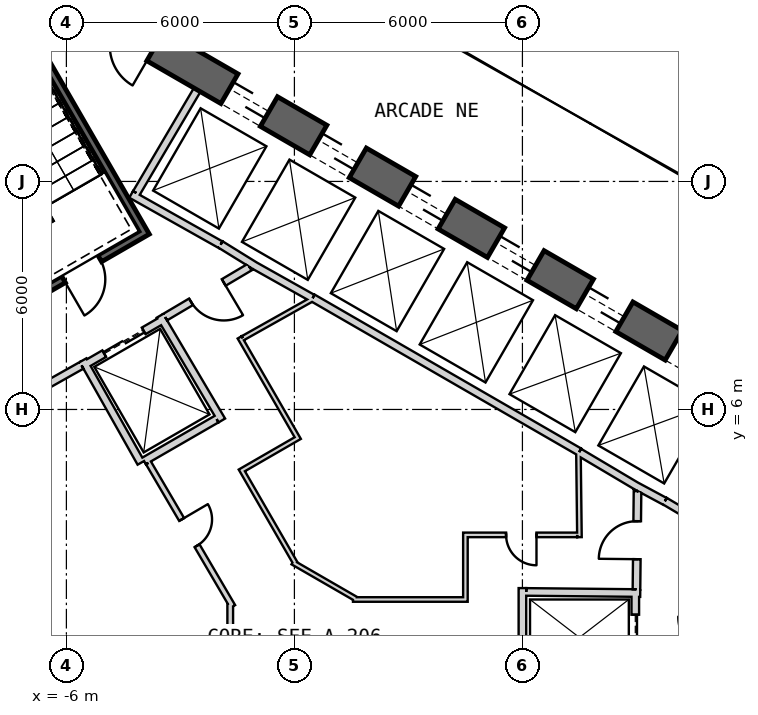
"""IFC4 building model, lengths in metres.
Left out: names, types, materials, properties, quantities, classifications, styles, units other than length and angle.
Written with IfcOpenShell. Run it as: python <this file> out.ifc"""

import sys

from ifc_helpers import new_model, si_unit, direction, frame, frame_2d, origin, place, context, subcontext, project, spatial, rectangle, extrude, element, fill, save


model = new_model("IFC4")
c1 = context("Model", 3, precision=1e-05, world=origin(), true_north=direction((0.0, 1.0)))
c2 = subcontext(c1, "Body", "Model", "MODEL_VIEW")
j1 = project(units=[si_unit("LENGTHUNIT", "METRE"), si_unit("PLANEANGLEUNIT", "RADIAN")], contexts=[c1])
p1 = place(None, origin())
s1 = spatial("IfcSite", under=j1, at=p1, CompositionType="ELEMENT")
p2 = place(p1, origin())
s2 = spatial("IfcBuilding", under=s1, at=p2, CompositionType="ELEMENT")
p3 = place(p2, frame((0.0, 0.0, 21.5)))
s3 = spatial("IfcBuildingStorey", under=s2, at=p3, CompositionType="ELEMENT", Elevation=21.5)
p4 = place(p3, frame((19.475, 2.208, 0.0), z_axis=(0.0, 0.0, 1.0), x_axis=(-0.866028369851, 0.499994862586, 0.0)))
e1 = element("IfcWall", 1, at=p4, inside=s3, PredefinedType="SHEAR", context=c2, shape_type="SweptSolid", body=[
    extrude(rectangle(XDim=31.523, YDim=0.9, at=frame_2d((15.762, 0.0))), origin(), (0.0, 0.0, 1.0), 6.0),
])
p5 = place(p4, frame((7.062, 0.0, 0.0)))
e2 = element("IfcOpeningElement", 2, at=p5, cuts=e1, PredefinedType="OPENING", context=c2, shape_type="SweptSolid", body=[
    extrude(rectangle(XDim=1.2, YDim=2.4, at=frame_2d((0.6, 1.2))), frame((0.0, 0.46, 0.0), z_axis=(0.0, -1.0, 0.0), x_axis=(1.0, 0.0, 0.0)), (0.0, 0.0, 1.0), 0.92),
])
p6 = place(p4, frame((9.762, 0.0, 0.0)))
e3 = element("IfcOpeningElement", 3, at=p6, cuts=e1, PredefinedType="OPENING", context=c2, shape_type="SweptSolid", body=[
    extrude(rectangle(XDim=1.2, YDim=2.4, at=frame_2d((0.6, 1.2))), frame((0.0, 0.46, 0.0), z_axis=(0.0, -1.0, 0.0), x_axis=(1.0, 0.0, 0.0)), (0.0, 0.0, 1.0), 0.92),
])
p7 = place(p4, frame((12.462, 0.0, 0.0)))
e4 = element("IfcOpeningElement", 4, at=p7, cuts=e1, PredefinedType="OPENING", context=c2, shape_type="SweptSolid", body=[
    extrude(rectangle(XDim=1.2, YDim=2.4, at=frame_2d((0.6, 1.2))), frame((0.0, 0.46, 0.0), z_axis=(0.0, -1.0, 0.0), x_axis=(1.0, 0.0, 0.0)), (0.0, 0.0, 1.0), 0.92),
])
p8 = place(p4, frame((15.162, 0.0, 0.0)))
e5 = element("IfcOpeningElement", 5, at=p8, cuts=e1, PredefinedType="OPENING", context=c2, shape_type="SweptSolid", body=[
    extrude(rectangle(XDim=1.2, YDim=2.4, at=frame_2d((0.6, 1.2))), frame((0.0, 0.46, 0.0), z_axis=(0.0, -1.0, 0.0), x_axis=(1.0, 0.0, 0.0)), (0.0, 0.0, 1.0), 0.92),
])
p9 = place(p4, frame((17.862, 0.0, 0.0)))
e6 = element("IfcOpeningElement", 6, at=p9, cuts=e1, PredefinedType="OPENING", context=c2, shape_type="SweptSolid", body=[
    extrude(rectangle(XDim=1.2, YDim=2.4, at=frame_2d((0.6, 1.2))), frame((0.0, 0.46, 0.0), z_axis=(0.0, -1.0, 0.0), x_axis=(1.0, 0.0, 0.0)), (0.0, 0.0, 1.0), 0.92),
])
p10 = place(p4, frame((20.562, 0.0, 0.0)))
e7 = element("IfcOpeningElement", 7, at=p10, cuts=e1, PredefinedType="OPENING", context=c2, shape_type="SweptSolid", body=[
    extrude(rectangle(XDim=1.2, YDim=2.4, at=frame_2d((0.6, 1.2))), frame((0.0, 0.46, 0.0), z_axis=(0.0, -1.0, 0.0), x_axis=(1.0, 0.0, 0.0)), (0.0, 0.0, 1.0), 0.92),
])
p11 = place(p4, frame((23.262, 0.0, 0.0)))
e8 = element("IfcOpeningElement", 8, at=p11, cuts=e1, PredefinedType="OPENING", context=c2, shape_type="SweptSolid", body=[
    extrude(rectangle(XDim=1.2, YDim=2.4, at=frame_2d((0.6, 1.2))), frame((0.0, 0.46, 0.0), z_axis=(0.0, -1.0, 0.0), x_axis=(1.0, 0.0, 0.0)), (0.0, 0.0, 1.0), 0.92),
])
p12 = place(p4, frame((3.612, 0.0, 0.0)))
e9 = element("IfcOpeningElement", 9, at=p12, cuts=e1, PredefinedType="OPENING", context=c2, shape_type="SweptSolid", body=[
    extrude(rectangle(XDim=1.2, YDim=2.4, at=frame_2d((0.6, 1.2))), frame((0.0, 0.46, 0.0), z_axis=(0.0, -1.0, 0.0), x_axis=(1.0, 0.0, 0.0)), (0.0, 0.0, 1.0), 0.92),
])
p13 = place(p4, frame((26.712, 0.0, 0.0)))
e10 = element("IfcOpeningElement", 10, at=p13, cuts=e1, PredefinedType="OPENING", context=c2, shape_type="SweptSolid", body=[
    extrude(rectangle(XDim=1.2, YDim=2.4, at=frame_2d((0.6, 1.2))), frame((0.0, 0.46, 0.0), z_axis=(0.0, -1.0, 0.0), x_axis=(1.0, 0.0, 0.0)), (0.0, 0.0, 1.0), 0.92),
])
p14 = place(p3, frame((7.497, 4.886, 0.0), z_axis=(0.0, 0.0, 1.0), x_axis=(-0.866030989016, 0.499990325971, 0.0)))
e11 = element("IfcWall", 11, at=p14, inside=s3, PredefinedType="PLUMBINGWALL", context=c2, shape_type="SweptSolid", body=[
    extrude(rectangle(XDim=8.1, YDim=0.2, at=frame_2d((4.05, 0.0))), origin(), (0.0, 0.0, 1.0), 5.7),
])
p15 = place(p3, frame((12.073, 2.211, 0.0), z_axis=(0.0, 0.0, 1.0), x_axis=(-0.860438357912, 0.509554542943, 0.0)))
e12 = element("IfcWall", 12, at=p15, inside=s3, PredefinedType="PLUMBINGWALL", context=c2, shape_type="SweptSolid", body=[
    extrude(rectangle(XDim=2.7, YDim=0.2, at=frame_2d((1.35, 0.0))), origin(), (0.0, 0.0, 1.0), 5.7),
])
p16 = place(p3, frame((9.748, 3.583, 0.0), z_axis=(0.0, 0.0, 1.0), x_axis=(-0.880917147855, 0.473270513147, 0.0)))
e13 = element("IfcWall", 13, at=p16, inside=s3, PredefinedType="PLUMBINGWALL", context=c2, shape_type="SweptSolid", body=[
    extrude(rectangle(XDim=0.878, YDim=0.2, at=frame_2d((0.439, 0.0))), origin(), (0.0, 0.0, 1.0), 5.7),
])
p17 = place(p3, frame((9.08, 3.937, 0.0), z_axis=(0.0, 0.0, 1.0), x_axis=(-0.859981807212, 0.510324691999, 0.0)))
e14 = element("IfcWall", 14, at=p17, inside=s3, PredefinedType="PLUMBINGWALL", context=c2, shape_type="SweptSolid", body=[
    extrude(rectangle(XDim=1.845, YDim=0.2, at=frame_2d((0.922, 0.0))), origin(), (0.0, 0.0, 1.0), 5.7),
])
p18 = place(p3, frame((-1.941, 10.339, 0.0), z_axis=(0.0, 0.0, 1.0), x_axis=(0.850216889117, -0.526432561171, 0.0)))
e15 = element("IfcWall", 15, at=p18, inside=s3, PredefinedType="PLUMBINGWALL", context=c2, shape_type="SweptSolid", body=[
    extrude(rectangle(XDim=1.078, YDim=0.2, at=frame_2d((0.539, 0.0))), origin(), (0.0, 0.0, 1.0), 5.7),
])
p19 = place(p3, frame((0.478, 8.928, 0.0), z_axis=(0.0, 0.0, 1.0), x_axis=(-0.871988740738, 0.489525929882, 0.0)))
e16 = element("IfcWall", 16, at=p19, inside=s3, PredefinedType="PLUMBINGWALL", context=c2, shape_type="SweptSolid", body=[
    extrude(rectangle(XDim=1.845, YDim=0.2, at=frame_2d((0.922, 0.0))), origin(), (0.0, 0.0, 1.0), 5.7),
])
p20 = place(p3, frame((-4.296, 11.659, 0.0), z_axis=(0.0, 0.0, 1.0), x_axis=(0.871534483978, -0.490334215854, 0.0)))
e17 = element("IfcWall", 17, at=p20, inside=s3, PredefinedType="PLUMBINGWALL", context=c2, shape_type="SweptSolid", body=[
    extrude(rectangle(XDim=2.7, YDim=0.2, at=frame_2d((1.35, 0.0))), origin(), (0.0, 0.0, 1.0), 5.7),
])
p21 = place(p3, frame((-4.158, 11.696, 0.0), z_axis=(0.0, 0.0, 1.0), x_axis=(0.508018930956, 0.861345903683, 0.0)))
e18 = element("IfcWall", 18, at=p21, inside=s3, PredefinedType="PLUMBINGWALL", context=c2, shape_type="SweptSolid", body=[
    extrude(rectangle(XDim=3.15, YDim=0.2, at=frame_2d((1.575, 0.0))), origin(), (0.0, 0.0, 1.0), 5.7),
])
p22 = place(p3, frame((8.97, 1.2, 0.0), z_axis=(0.0, 0.0, 1.0), x_axis=(0.0, -1.0, 0.0)))
e19 = element("IfcWall", 19, at=p22, inside=s3, PredefinedType="PLUMBINGWALL", context=c2, shape_type="SweptSolid", body=[
    extrude(rectangle(XDim=2.4, YDim=0.2, at=frame_2d((1.2, 0.0))), origin(), (0.0, 0.0, 1.0), 5.7),
])
p23 = place(p22, frame((0.6, 0.0, 0.0)))
e20 = element("IfcOpeningElement", 20, at=p23, cuts=e19, PredefinedType="OPENING", context=c2, shape_type="SweptSolid", body=[
    extrude(rectangle(XDim=1.2, YDim=2.4, at=frame_2d((0.6, 1.2))), frame((0.0, 0.11, 0.0), z_axis=(0.0, -1.0, 0.0), x_axis=(1.0, 0.0, 0.0)), (0.0, 0.0, 1.0), 0.22),
])
p24 = place(p3, frame((6.0, -1.104, 0.0), z_axis=(0.0, 0.0, 1.0), x_axis=(0.0, 1.0, 0.0)))
e21 = element("IfcWall", 21, at=p24, inside=s3, PredefinedType="PLUMBINGWALL", context=c2, shape_type="SweptSolid", body=[
    extrude(rectangle(XDim=2.405, YDim=0.2, at=frame_2d((1.202, 0.0))), origin(), (0.0, 0.0, 1.0), 5.7),
])
p25 = place(p3, frame((9.1, 1.169, 0.0), z_axis=(0.0, 0.0, 1.0), x_axis=(-0.99994990606, 0.010009264196, 0.0)))
e22 = element("IfcWall", 22, at=p25, inside=s3, PredefinedType="PLUMBINGWALL", context=c2, shape_type="SweptSolid", body=[
    extrude(rectangle(XDim=3.0, YDim=0.2, at=frame_2d((1.5, 0.0))), origin(), (0.0, 0.0, 1.0), 5.7),
])
p26 = place(p3, frame((-7.854, 17.405, -0.3), z_axis=(0.0, 0.0, 1.0), x_axis=(0.499997992926, -0.866026562566, 0.0)))
e23 = element("IfcWall", 23, at=p26, inside=s3, PredefinedType="SHEAR", context=c2, shape_type="SweptSolid", body=[
    extrude(rectangle(XDim=7.9, YDim=0.2, at=frame_2d((3.95, 0.0))), origin(), (0.0, 0.0, 1.0), 6.0),
])
p27 = place(p3, frame((-7.159, 8.8, -0.3), z_axis=(0.0, 0.0, 1.0), x_axis=(0.866047807691, 0.499961193289, 0.0)))
e24 = element("IfcWall", 24, at=p27, inside=s3, PredefinedType="SHEAR", context=c2, shape_type="SweptSolid", body=[
    extrude(rectangle(XDim=3.6, YDim=0.2, at=frame_2d((1.8, 0.0))), origin(), (0.0, 0.0, 1.0), 6.0),
])
p28 = place(p27, frame((1.25, 0.0, 0.3)))
e25 = element("IfcOpeningElement", 25, at=p28, cuts=e24, PredefinedType="OPENING", context=c2, shape_type="SweptSolid", body=[
    extrude(rectangle(XDim=1.1, YDim=2.1, at=frame_2d((0.55, 1.05))), frame((0.0, 0.11, 0.0), z_axis=(0.0, -1.0, 0.0), x_axis=(1.0, 0.0, 0.0)), (0.0, 0.0, 1.0), 0.22),
])
p29 = place(p3, frame((-5.524, 7.168, 0.0), z_axis=(0.0, 0.0, 1.0), x_axis=(0.866024647952, 0.500001309137, 0.0)))
e26 = element("IfcWall", 26, at=p29, inside=s3, PredefinedType="PLUMBINGWALL", context=c2, shape_type="SweptSolid", body=[
    extrude(rectangle(XDim=2.4, YDim=0.2, at=frame_2d((1.2, 0.0))), origin(), (0.0, 0.0, 1.0), 5.7),
])
p30 = place(p29, frame((0.6, 0.0, 0.0)))
e27 = element("IfcOpeningElement", 27, at=p30, cuts=e26, PredefinedType="OPENING", context=c2, shape_type="SweptSolid", body=[
    extrude(rectangle(XDim=1.2, YDim=2.4, at=frame_2d((0.6, 1.2))), frame((0.0, 0.11, 0.0), z_axis=(0.0, -1.0, 0.0), x_axis=(1.0, 0.0, 0.0)), (0.0, 0.0, 1.0), 0.22),
])
p31 = place(p3, frame((-4.039, 4.596, 0.0), z_axis=(0.0, 0.0, 1.0), x_axis=(-0.491322718731, 0.870977603649, 0.0)))
e28 = element("IfcWall", 28, at=p31, inside=s3, PredefinedType="PLUMBINGWALL", context=c2, shape_type="SweptSolid", body=[
    extrude(rectangle(XDim=3.1, YDim=0.2, at=frame_2d((1.55, 0.0))), origin(), (0.0, 0.0, 1.0), 5.7),
])
p32 = place(p3, frame((-3.538, 8.465, 0.0), z_axis=(0.0, 0.0, 1.0), x_axis=(0.508616218331, -0.860993346345, 0.0)))
e29 = element("IfcWall", 29, at=p32, inside=s3, PredefinedType="PLUMBINGWALL", context=c2, shape_type="SweptSolid", body=[
    extrude(rectangle(XDim=3.2, YDim=0.2, at=frame_2d((1.6, 0.0))), origin(), (0.0, 0.0, 1.0), 5.7),
])
p33 = place(p3, frame((-2.047, 5.746, 0.0), z_axis=(0.0, 0.0, 1.0), x_axis=(-0.866019606374, -0.500010041276, 0.0)))
e30 = element("IfcWall", 30, at=p33, inside=s3, PredefinedType="PLUMBINGWALL", context=c2, shape_type="SweptSolid", body=[
    extrude(rectangle(XDim=2.205, YDim=0.2, at=frame_2d((1.102, 0.0))), origin(), (0.0, 0.0, 1.0), 5.7),
])
p34 = place(p3, frame((9.001, 1.27, 0.0), z_axis=(0.0, 0.0, 1.0), x_axis=(0.010783593937, 0.99994185536, 0.0)))
e31 = element("IfcWall", 31, at=p34, inside=s3, PredefinedType="PARTITIONING", context=c2, shape_type="SweptSolid", body=[
    extrude(rectangle(XDim=2.581, YDim=0.2, at=frame_2d((1.291, 0.0))), origin(), (0.0, 0.0, 1.0), 5.7),
])
p35 = place(p34, frame((0.791, 0.0, 0.0)))
e32 = element("IfcOpeningElement", 32, at=p35, cuts=e31, PredefinedType="OPENING", context=c2, shape_type="SweptSolid", body=[
    extrude(rectangle(XDim=1.0, YDim=2.1, at=frame_2d((0.5, 1.05))), frame((0.0, 0.11, 0.0), z_axis=(0.0, -1.0, 0.0), x_axis=(1.0, 0.0, 0.0)), (0.0, 0.0, 1.0), 0.22),
])
p36 = place(p3, frame((-5.6, 7.16, 0.0), z_axis=(0.0, 0.0, 1.0), x_axis=(-0.871340486379, -0.490678873396, 0.0)))
e33 = element("IfcWall", 33, at=p36, inside=s3, PredefinedType="PARTITIONING", context=c2, shape_type="SweptSolid", body=[
    extrude(rectangle(XDim=2.581, YDim=0.2, at=frame_2d((1.291, 0.0))), origin(), (0.0, 0.0, 1.0), 5.7),
])
p37 = place(p3, frame((-1.179, 9.745, 0.0), z_axis=(0.0, 0.0, 1.0), x_axis=(-0.860598681535, -0.509283721849, 0.0)))
e34 = element("IfcWall", 34, at=p37, inside=s3, PredefinedType="PARTITIONING", context=c2, shape_type="SweptSolid", body=[
    extrude(rectangle(XDim=2.581, YDim=0.2, at=frame_2d((1.291, 0.0))), origin(), (0.0, 0.0, 1.0), 5.7),
])
p38 = place(p37, frame((0.791, 0.0, 0.0)))
e35 = element("IfcOpeningElement", 35, at=p38, cuts=e34, PredefinedType="OPENING", context=c2, shape_type="SweptSolid", body=[
    extrude(rectangle(XDim=1.0, YDim=2.1, at=frame_2d((0.5, 1.05))), frame((0.0, 0.11, 0.0), z_axis=(0.0, -1.0, 0.0), x_axis=(1.0, 0.0, 0.0)), (0.0, 0.0, 1.0), 0.22),
])
p39 = place(p3, frame((-1.624, 0.815, 0.0), z_axis=(0.0, 0.0, 1.0), x_axis=(-0.505868173579, 0.862610799237, 0.0)))
e36 = element("IfcWall", 36, at=p39, inside=s3, PredefinedType="PLUMBINGWALL", context=c2, shape_type="SweptSolid", body=[
    extrude(rectangle(XDim=4.383, YDim=0.15, at=frame_2d((2.191, 0.0))), origin(), (0.0, 0.0, 1.0), 5.7),
])
p40 = place(p39, frame((1.855, 0.0, 0.0)))
e37 = element("IfcOpeningElement", 37, at=p40, cuts=e36, PredefinedType="OPENING", context=c2, shape_type="SweptSolid", body=[
    extrude(rectangle(XDim=0.8, YDim=2.1, at=frame_2d((0.4, 1.05))), frame((0.0, 0.085, 0.0), z_axis=(0.0, -1.0, 0.0), x_axis=(1.0, 0.0, 0.0)), (0.0, 0.0, 1.0), 0.17),
])
p41 = place(p3, frame((-1.689, -1.053, 0.0), z_axis=(0.0, 0.0, 1.0), x_axis=(0.0, 1.0, 0.0)))
e38 = element("IfcWall", 38, at=p41, inside=s3, PredefinedType="PLUMBINGWALL", context=c2, shape_type="SweptSolid", body=[
    extrude(rectangle(XDim=1.954, YDim=0.15, at=frame_2d((0.977, 0.0))), origin(), (0.0, 0.0, 1.0), 5.7),
])
p42 = place(p3, frame((7.501, 2.64, 0.0), z_axis=(0.0, 0.0, 1.0), x_axis=(-0.01174194727, 0.999931060961, 0.0)))
e39 = element("IfcWall", 39, at=p42, inside=s3, PredefinedType="PARTITIONING", context=c2, shape_type="SweptSolid", body=[
    extrude(rectangle(XDim=2.225, YDim=0.12, at=frame_2d((1.112, 0.0))), origin(), (0.0, 0.0, 1.0), 5.7),
])
p43 = place(p3, frame((4.44, 2.7, 0.0), z_axis=(0.0, 0.0, 1.0), x_axis=(1.0, 0.0, 0.0)))
e40 = element("IfcWall", 40, at=p43, inside=s3, PredefinedType="PARTITIONING", context=c2, shape_type="SweptSolid", body=[
    extrude(rectangle(XDim=3.0, YDim=0.12, at=frame_2d((1.5, 0.0))), origin(), (0.0, 0.0, 1.0), 5.7),
])
p44 = place(p43, frame((1.13, 0.0, 0.0)))
e41 = element("IfcOpeningElement", 41, at=p44, cuts=e40, PredefinedType="OPENING", context=c2, shape_type="SweptSolid", body=[
    extrude(rectangle(XDim=0.8, YDim=2.1, at=frame_2d((0.4, 1.05))), frame((0.0, 0.07, 0.0), z_axis=(0.0, -1.0, 0.0), x_axis=(1.0, 0.0, 0.0)), (0.0, 0.0, 1.0), 0.14),
])
p45 = place(p3, frame((4.5, 0.94, 0.0), z_axis=(0.0, 0.0, 1.0), x_axis=(0.0, 1.0, 0.0)))
e42 = element("IfcWall", 42, at=p45, inside=s3, PredefinedType="PARTITIONING", context=c2, shape_type="SweptSolid", body=[
    extrude(rectangle(XDim=1.7, YDim=0.12, at=frame_2d((0.85, 0.0))), origin(), (0.0, 0.0, 1.0), 5.7),
])
p46 = place(p3, frame((1.542, 1.0, 0.0), z_axis=(0.0, 0.0, 1.0), x_axis=(1.0, 0.0, 0.0)))
e43 = element("IfcWall", 43, at=p46, inside=s3, PredefinedType="PARTITIONING", context=c2, shape_type="SweptSolid", body=[
    extrude(rectangle(XDim=2.898, YDim=0.12, at=frame_2d((1.449, 0.0))), origin(), (0.0, 0.0, 1.0), 5.7),
])
p47 = place(p3, frame((-0.047, 1.977, 0.0), z_axis=(0.0, 0.0, 1.0), x_axis=(0.865998615205, -0.500046396311, 0.0)))
e44 = element("IfcWall", 44, at=p47, inside=s3, PredefinedType="PARTITIONING", context=c2, shape_type="SweptSolid", body=[
    extrude(rectangle(XDim=1.935, YDim=0.12, at=frame_2d((0.968, 0.0))), origin(), (0.0, 0.0, 1.0), 5.7),
])
p48 = place(p3, frame((-1.414, 4.449, 0.0), z_axis=(0.0, 0.0, 1.0), x_axis=(0.500028961621, -0.866008682139, 0.0)))
e45 = element("IfcWall", 45, at=p48, inside=s3, PredefinedType="PARTITIONING", context=c2, shape_type="SweptSolid", body=[
    extrude(rectangle(XDim=2.896, YDim=0.12, at=frame_2d((1.448, 0.0))), origin(), (0.0, 0.0, 1.0), 5.7),
])
p49 = place(p3, frame((0.14, 5.277, 0.0), z_axis=(0.0, 0.0, 1.0), x_axis=(-0.865989465428, -0.500062241894, 0.0)))
e46 = element("IfcWall", 46, at=p49, inside=s3, PredefinedType="PARTITIONING", context=c2, shape_type="SweptSolid", body=[
    extrude(rectangle(XDim=1.7, YDim=0.12, at=frame_2d((0.85, 0.0))), origin(), (0.0, 0.0, 1.0), 5.7),
])
p50 = place(p3, frame((-1.442, 7.897, 0.0), z_axis=(0.0, 0.0, 1.0), x_axis=(0.499990139034, -0.866031096941, 0.0)))
e47 = element("IfcWall", 47, at=p50, inside=s3, PredefinedType="PARTITIONING", context=c2, shape_type="SweptSolid", body=[
    extrude(rectangle(XDim=3.0, YDim=0.12, at=frame_2d((1.5, 0.0))), origin(), (0.0, 0.0, 1.0), 5.7),
])
p51 = place(p3, frame((0.475, 8.905, 0.0), z_axis=(0.0, 0.0, 1.0), x_axis=(-0.871832572129, -0.489804007921, 0.0)))
e48 = element("IfcWall", 48, at=p51, inside=s3, PredefinedType="PARTITIONING", context=c2, shape_type="SweptSolid", body=[
    extrude(rectangle(XDim=2.104, YDim=0.12, at=frame_2d((1.052, 0.0))), origin(), (0.0, 0.0, 1.0), 5.7),
])
p52 = place(p35, origin())
e49 = element("IfcDoor", 49, at=p52, inside=s3, OperationType="SINGLE_SWING_LEFT", PredefinedType="USERDEFINED", context=c2, shape_type="SweptSolid", body=[
    extrude(rectangle(XDim=1.0, YDim=2.1, at=frame_2d((0.5, 1.05))), frame((0.0, 0.025, 0.0), z_axis=(0.0, -1.0, 0.0), x_axis=(1.0, 0.0, 0.0)), (0.0, 0.0, 1.0), 0.05),
])
fill(e32, e49)
p53 = place(p23, origin())
e50 = element("IfcDoor", 50, at=p53, inside=s3, OperationType="SLIDING_TO_LEFT", PredefinedType="USERDEFINED", context=c2, shape_type="SweptSolid", body=[
    extrude(rectangle(XDim=1.2, YDim=2.4, at=frame_2d((0.6, 1.2))), frame((0.0, 0.025, 0.0), z_axis=(0.0, -1.0, 0.0), x_axis=(1.0, 0.0, 0.0)), (0.0, 0.0, 1.0), 0.05),
])
fill(e20, e50)
p54 = place(p28, origin())
e51 = element("IfcDoor", 51, at=p54, inside=s3, OperationType="SINGLE_SWING_LEFT", PredefinedType="USERDEFINED", context=c2, shape_type="SweptSolid", body=[
    extrude(rectangle(XDim=1.1, YDim=2.1, at=frame_2d((0.55, 1.05))), frame((0.0, 0.025, 0.0), z_axis=(0.0, -1.0, 0.0), x_axis=(1.0, 0.0, 0.0)), (0.0, 0.0, 1.0), 0.05),
])
fill(e25, e51)
p55 = place(p38, origin())
e52 = element("IfcDoor", 52, at=p55, inside=s3, OperationType="SINGLE_SWING_LEFT", PredefinedType="USERDEFINED", context=c2, shape_type="SweptSolid", body=[
    extrude(rectangle(XDim=1.0, YDim=2.1, at=frame_2d((0.5, 1.05))), frame((0.0, 0.025, 0.0), z_axis=(0.0, -1.0, 0.0), x_axis=(1.0, 0.0, 0.0)), (0.0, 0.0, 1.0), 0.05),
])
fill(e35, e52)
p56 = place(p30, origin())
e53 = element("IfcDoor", 53, at=p56, inside=s3, OperationType="SLIDING_TO_LEFT", PredefinedType="USERDEFINED", context=c2, shape_type="SweptSolid", body=[
    extrude(rectangle(XDim=1.2, YDim=2.4, at=frame_2d((0.6, 1.2))), frame((0.0, 0.025, 0.0), z_axis=(0.0, -1.0, 0.0), x_axis=(1.0, 0.0, 0.0)), (0.0, 0.0, 1.0), 0.05),
])
fill(e27, e53)
p57 = place(p40, origin())
e54 = element("IfcDoor", 54, at=p57, inside=s3, OperationType="SINGLE_SWING_RIGHT", PredefinedType="USERDEFINED", context=c2, shape_type="SweptSolid", body=[
    extrude(rectangle(XDim=0.8, YDim=2.1, at=frame_2d((0.4, 1.05))), frame((0.0, 0.025, 0.0), z_axis=(0.0, -1.0, 0.0), x_axis=(1.0, 0.0, 0.0)), (0.0, 0.0, 1.0), 0.05),
])
fill(e37, e54)
p58 = place(p44, origin())
e55 = element("IfcDoor", 55, at=p58, inside=s3, OperationType="SINGLE_SWING_RIGHT", PredefinedType="USERDEFINED", context=c2, shape_type="SweptSolid", body=[
    extrude(rectangle(XDim=0.8, YDim=2.1, at=frame_2d((0.4, 1.05))), frame((0.0, 0.025, 0.0), z_axis=(0.0, -1.0, 0.0), x_axis=(1.0, 0.0, 0.0)), (0.0, 0.0, 1.0), 0.05),
])
fill(e41, e55)
p59 = place(p6, origin())
e56 = element("IfcDoor", 56, at=p59, inside=s3, OperationType="SLIDING_TO_LEFT", PredefinedType="USERDEFINED", context=c2, shape_type="SweptSolid", body=[
    extrude(rectangle(XDim=1.2, YDim=2.4, at=frame_2d((0.6, 1.2))), frame((0.0, 0.025, 0.0), z_axis=(0.0, -1.0, 0.0), x_axis=(1.0, 0.0, 0.0)), (0.0, 0.0, 1.0), 0.05),
])
fill(e3, e56)
p60 = place(p7, origin())
e57 = element("IfcDoor", 57, at=p60, inside=s3, OperationType="SLIDING_TO_LEFT", PredefinedType="USERDEFINED", context=c2, shape_type="SweptSolid", body=[
    extrude(rectangle(XDim=1.2, YDim=2.4, at=frame_2d((0.6, 1.2))), frame((0.0, 0.025, 0.0), z_axis=(0.0, -1.0, 0.0), x_axis=(1.0, 0.0, 0.0)), (0.0, 0.0, 1.0), 0.05),
])
fill(e4, e57)
p61 = place(p8, origin())
e58 = element("IfcDoor", 58, at=p61, inside=s3, OperationType="SLIDING_TO_LEFT", PredefinedType="USERDEFINED", context=c2, shape_type="SweptSolid", body=[
    extrude(rectangle(XDim=1.2, YDim=2.4, at=frame_2d((0.6, 1.2))), frame((0.0, 0.025, 0.0), z_axis=(0.0, -1.0, 0.0), x_axis=(1.0, 0.0, 0.0)), (0.0, 0.0, 1.0), 0.05),
])
fill(e5, e58)
p62 = place(p9, origin())
e59 = element("IfcDoor", 59, at=p62, inside=s3, OperationType="SLIDING_TO_LEFT", PredefinedType="USERDEFINED", context=c2, shape_type="SweptSolid", body=[
    extrude(rectangle(XDim=1.2, YDim=2.4, at=frame_2d((0.6, 1.2))), frame((0.0, 0.025, 0.0), z_axis=(0.0, -1.0, 0.0), x_axis=(1.0, 0.0, 0.0)), (0.0, 0.0, 1.0), 0.05),
])
fill(e6, e59)
p63 = place(p10, origin())
e60 = element("IfcDoor", 60, at=p63, inside=s3, OperationType="SLIDING_TO_LEFT", PredefinedType="USERDEFINED", context=c2, shape_type="SweptSolid", body=[
    extrude(rectangle(XDim=1.2, YDim=2.4, at=frame_2d((0.6, 1.2))), frame((0.0, 0.025, 0.0), z_axis=(0.0, -1.0, 0.0), x_axis=(1.0, 0.0, 0.0)), (0.0, 0.0, 1.0), 0.05),
])
fill(e7, e60)
p64 = place(p11, origin())
e61 = element("IfcDoor", 61, at=p64, inside=s3, OperationType="SLIDING_TO_LEFT", PredefinedType="USERDEFINED", context=c2, shape_type="SweptSolid", body=[
    extrude(rectangle(XDim=1.2, YDim=2.4, at=frame_2d((0.6, 1.2))), frame((0.0, 0.025, 0.0), z_axis=(0.0, -1.0, 0.0), x_axis=(1.0, 0.0, 0.0)), (0.0, 0.0, 1.0), 0.05),
])
fill(e8, e61)
save(model, sys.argv[1])
